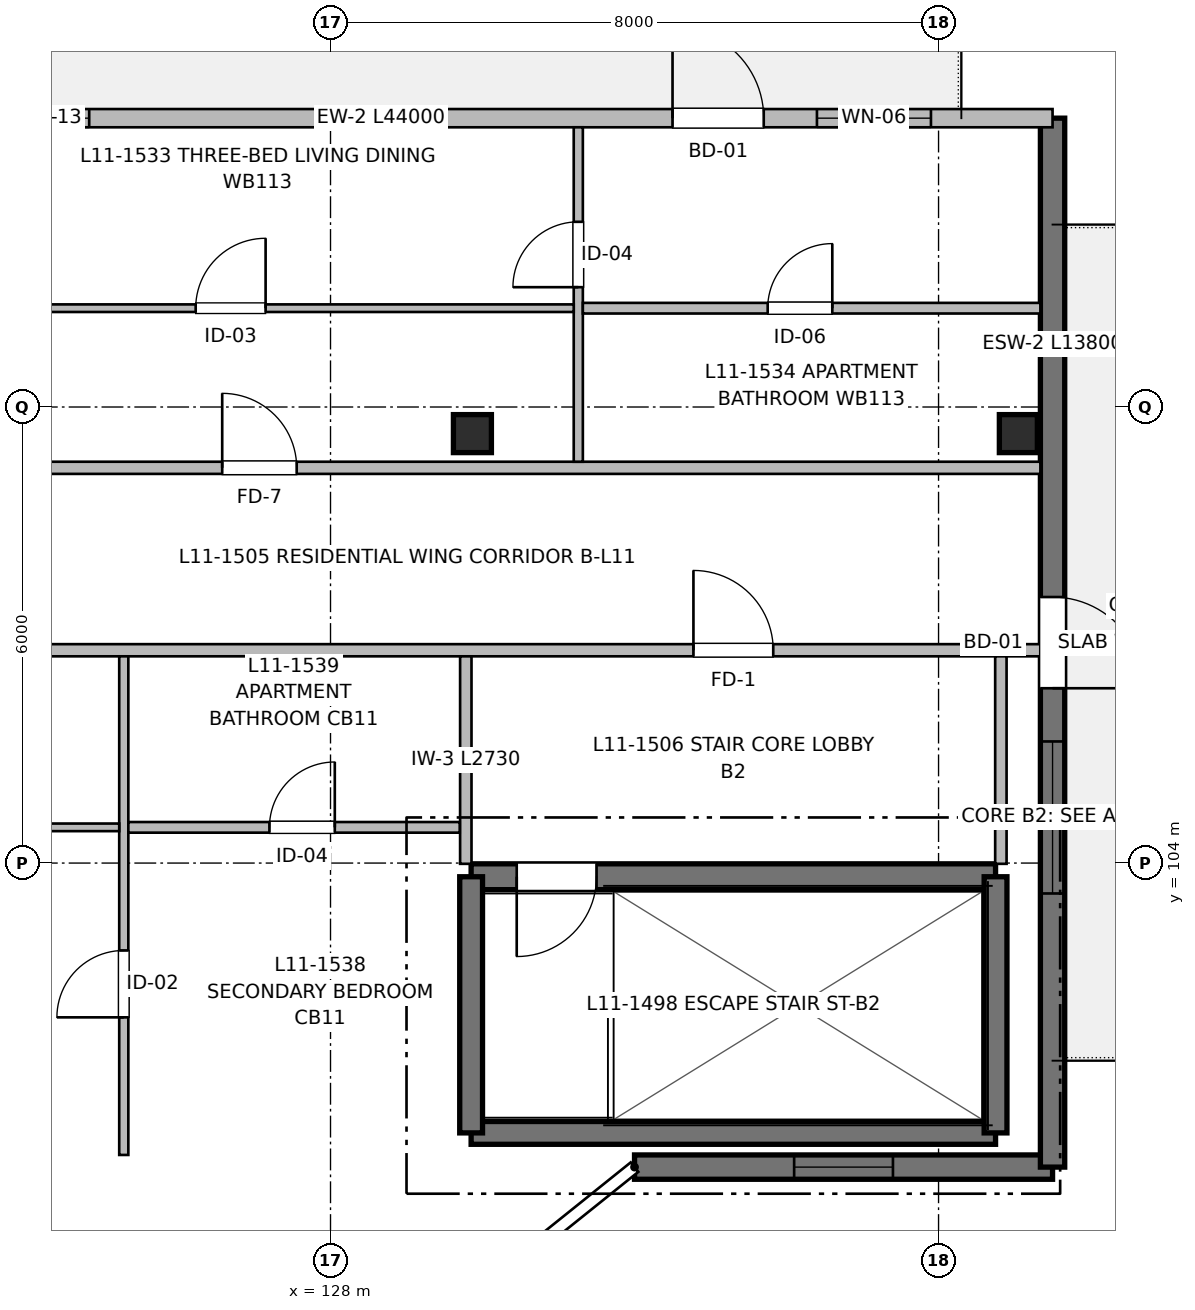
"""IFC4 building model, lengths in metres.
Left out: names, types, materials, properties, quantities, classifications, styles, units other than length and angle.
Written with IfcOpenShell. Run it as: python <this file> out.ifc"""

import sys

from ifc_helpers import new_model, si_unit, direction, frame, frame_2d, origin, origin_2d, place, context, subcontext, project, spatial, rectangle, extrude, element, fill, save


model = new_model("IFC4")
c1 = context("Model", 3, precision=1e-05, world=origin(), true_north=direction((0.0, 1.0)))
c2 = subcontext(c1, "Body", "Model", "MODEL_VIEW")
j1 = project(units=[si_unit("LENGTHUNIT", "METRE"), si_unit("PLANEANGLEUNIT", "RADIAN")], contexts=[c1])
p1 = place(None, origin())
s1 = spatial("IfcSite", under=j1, at=p1, CompositionType="ELEMENT")
p2 = place(p1, origin())
s2 = spatial("IfcBuilding", under=s1, at=p2, CompositionType="ELEMENT")
p3 = place(p2, frame((0.0, 0.0, 36.16)))
s3 = spatial("IfcBuildingStorey", under=s2, at=p3, CompositionType="ELEMENT", Elevation=36.16)
for number, where, z_axis, x_axis in (
    (1, (129.867, 109.65, 0.0), (0.0, 0.0, 1.0), (1.0, 0.0, 0.0)),
    (2, (137.05, 109.65, 0.0), (0.0, 0.0, 1.0), (1.0, 0.0, 0.0)),
):
    element("IfcColumn", number, at=place(p3, frame(where, z_axis=z_axis, x_axis=x_axis)), inside=s3, PredefinedType="COLUMN", context=c2, shape_type="SweptSolid", body=[
        extrude(rectangle(XDim=0.5, YDim=0.5, at=origin_2d()), origin(), (0.0, 0.0, 1.0), 3.2),
    ])
p4 = place(p3, frame((129.85, 100.45, 0.0), z_axis=(0.0, 0.0, 1.0), x_axis=(1.0, 0.0, 0.0)))
e3 = element("IfcWall", 3, at=p4, inside=s3, PredefinedType="SHEAR", context=c2, shape_type="SweptSolid", body=[
    extrude(rectangle(XDim=6.9, YDim=0.3, at=frame_2d((3.45, 0.0))), origin(), (0.0, 0.0, 1.0), 3.2),
])
p5 = place(p3, frame((136.75, 103.82, 0.0), z_axis=(0.0, 0.0, 1.0), x_axis=(-1.0, 0.0, 0.0)))
e4 = element("IfcWall", 4, at=p5, inside=s3, PredefinedType="SHEAR", context=c2, shape_type="SweptSolid", body=[
    extrude(rectangle(XDim=6.9, YDim=0.34, at=frame_2d((3.45, 0.0))), origin(), (0.0, 0.0, 1.0), 3.2),
])
p6 = place(p5, frame((5.25, 0.0, 0.0)))
e5 = element("IfcOpeningElement", 5, at=p6, cuts=e4, PredefinedType="OPENING", context=c2, shape_type="SweptSolid", body=[
    extrude(rectangle(XDim=1.05, YDim=2.15, at=frame_2d((0.525, 1.075))), frame((0.0, 0.18, 0.0), z_axis=(0.0, -1.0, 0.0), x_axis=(1.0, 0.0, 0.0)), (0.0, 0.0, 1.0), 0.36),
])
for number, where, z_axis, x_axis in (
    (6, (129.85, 103.82, 0.0), (0.0, 0.0, 1.0), (0.0, -1.0, 0.0)),
    (7, (136.75, 100.45, 0.0), (0.0, 0.0, 1.0), (0.0, 1.0, 0.0)),
):
    element("IfcWall", number, at=place(p3, frame(where, z_axis=z_axis, x_axis=x_axis)), inside=s3, PredefinedType="SHEAR", context=c2, shape_type="SweptSolid", body=[
        extrude(rectangle(XDim=3.37, YDim=0.3, at=frame_2d((1.685, 0.0))), origin(), (0.0, 0.0, 1.0), 3.2),
    ])
p7 = place(p3, frame((137.5, 100.0, 0.0), z_axis=(0.0, 0.0, 1.0), x_axis=(-1.0, 0.0, 0.0)))
e8 = element("IfcWall", 8, at=p7, inside=s3, PredefinedType="SHEAR", context=c2, shape_type="SweptSolid", body=[
    extrude(rectangle(XDim=5.5, YDim=0.32, at=frame_2d((2.75, 0.0))), origin(), (0.0, 0.0, 1.0), 2.98),
])
p8 = place(p7, frame((2.1, 0.0, 0.82)))
e9 = element("IfcOpeningElement", 9, at=p8, cuts=e8, PredefinedType="OPENING", context=c2, shape_type="SweptSolid", body=[
    extrude(rectangle(XDim=1.3, YDim=1.4, at=frame_2d((0.65, 0.7))), frame((0.0, 0.17, 0.0), z_axis=(0.0, -1.0, 0.0), x_axis=(1.0, 0.0, 0.0)), (0.0, 0.0, 1.0), 0.34),
])
p9 = place(p3, frame((137.5, 113.8, 0.0), z_axis=(0.0, 0.0, 1.0), x_axis=(0.0, -1.0, 0.0)))
e10 = element("IfcWall", 10, at=p9, inside=s3, PredefinedType="SHEAR", context=c2, shape_type="SweptSolid", body=[
    extrude(rectangle(XDim=13.8, YDim=0.32, at=frame_2d((6.9, 0.0))), origin(), (0.0, 0.0, 1.0), 2.98),
])
p10 = place(p9, frame((6.3, 0.0, 0.0)))
e11 = element("IfcOpeningElement", 11, at=p10, cuts=e10, PredefinedType="OPENING", context=c2, shape_type="SweptSolid", body=[
    extrude(rectangle(XDim=1.2, YDim=2.2, at=frame_2d((0.6, 1.1))), frame((0.0, 0.17, 0.0), z_axis=(0.0, -1.0, 0.0), x_axis=(1.0, 0.0, 0.0)), (0.0, 0.0, 1.0), 0.34),
])
p11 = place(p9, frame((8.2, 0.0, 0.72)))
e12 = element("IfcOpeningElement", 12, at=p11, cuts=e10, PredefinedType="OPENING", context=c2, shape_type="SweptSolid", body=[
    extrude(rectangle(XDim=2.0, YDim=1.5, at=frame_2d((1.0, 0.75))), frame((0.0, 0.17, 0.0), z_axis=(0.0, -1.0, 0.0), x_axis=(1.0, 0.0, 0.0)), (0.0, 0.0, 1.0), 0.34),
])
p12 = place(p3, frame((93.5, 113.8, 0.0), z_axis=(0.0, 0.0, 1.0), x_axis=(1.0, 0.0, 0.0)))
e13 = element("IfcWall", 13, at=p12, inside=s3, PredefinedType="SOLIDWALL", context=c2, shape_type="SweptSolid", body=[
    extrude(rectangle(XDim=44.0, YDim=0.24, at=frame_2d((22.0, 0.0))), origin(), (0.0, 0.0, 1.0), 2.98),
])
p13 = place(p12, frame((3.8, 0.0, 0.0)))
e14 = element("IfcOpeningElement", 14, at=p13, cuts=e13, PredefinedType="OPENING", context=c2, shape_type="SweptSolid", body=[
    extrude(rectangle(XDim=1.2, YDim=2.2, at=frame_2d((0.6, 1.1))), frame((0.0, 0.13, 0.0), z_axis=(0.0, -1.0, 0.0), x_axis=(1.0, 0.0, 0.0)), (0.0, 0.0, 1.0), 0.26),
])
p14 = place(p12, frame((5.7, 0.0, 0.72)))
e15 = element("IfcOpeningElement", 15, at=p14, cuts=e13, PredefinedType="OPENING", context=c2, shape_type="SweptSolid", body=[
    extrude(rectangle(XDim=2.0, YDim=1.5, at=frame_2d((1.0, 0.75))), frame((0.0, 0.13, 0.0), z_axis=(0.0, -1.0, 0.0), x_axis=(1.0, 0.0, 0.0)), (0.0, 0.0, 1.0), 0.26),
])
p15 = place(p12, frame((12.15, 0.0, 0.67)))
e16 = element("IfcOpeningElement", 16, at=p15, cuts=e13, PredefinedType="OPENING", context=c2, shape_type="SweptSolid", body=[
    extrude(rectangle(XDim=2.1, YDim=1.55, at=frame_2d((1.05, 0.775))), frame((0.0, 0.13, 0.0), z_axis=(0.0, -1.0, 0.0), x_axis=(1.0, 0.0, 0.0)), (0.0, 0.0, 1.0), 0.26),
])
p16 = place(p12, frame((21.4, 0.0, 0.0)))
e17 = element("IfcOpeningElement", 17, at=p16, cuts=e13, PredefinedType="OPENING", context=c2, shape_type="SweptSolid", body=[
    extrude(rectangle(XDim=1.2, YDim=2.2, at=frame_2d((0.6, 1.1))), frame((0.0, 0.13, 0.0), z_axis=(0.0, -1.0, 0.0), x_axis=(1.0, 0.0, 0.0)), (0.0, 0.0, 1.0), 0.26),
])
p17 = place(p12, frame((23.3, 0.0, 0.77)))
e18 = element("IfcOpeningElement", 18, at=p17, cuts=e13, PredefinedType="OPENING", context=c2, shape_type="SweptSolid", body=[
    extrude(rectangle(XDim=1.6, YDim=1.45, at=frame_2d((0.8, 0.725))), frame((0.0, 0.13, 0.0), z_axis=(0.0, -1.0, 0.0), x_axis=(1.0, 0.0, 0.0)), (0.0, 0.0, 1.0), 0.26),
])
p18 = place(p12, frame((30.275, 0.0, 0.9)))
e19 = element("IfcOpeningElement", 19, at=p18, cuts=e13, PredefinedType="OPENING", context=c2, shape_type="SweptSolid", body=[
    extrude(rectangle(XDim=1.05, YDim=1.15, at=frame_2d((0.525, 0.575))), frame((0.0, 0.13, 0.0), z_axis=(0.0, -1.0, 0.0), x_axis=(1.0, 0.0, 0.0)), (0.0, 0.0, 1.0), 0.26),
])
p19 = place(p12, frame((39.0, 0.0, 0.0)))
e20 = element("IfcOpeningElement", 20, at=p19, cuts=e13, PredefinedType="OPENING", context=c2, shape_type="SweptSolid", body=[
    extrude(rectangle(XDim=1.2, YDim=2.2, at=frame_2d((0.6, 1.1))), frame((0.0, 0.13, 0.0), z_axis=(0.0, -1.0, 0.0), x_axis=(1.0, 0.0, 0.0)), (0.0, 0.0, 1.0), 0.26),
])
p20 = place(p12, frame((40.9, 0.0, 0.82)))
e21 = element("IfcOpeningElement", 21, at=p20, cuts=e13, PredefinedType="OPENING", context=c2, shape_type="SweptSolid", body=[
    extrude(rectangle(XDim=1.5, YDim=1.4, at=frame_2d((0.75, 0.7))), frame((0.0, 0.13, 0.0), z_axis=(0.0, -1.0, 0.0), x_axis=(1.0, 0.0, 0.0)), (0.0, 0.0, 1.0), 0.26),
])
p21 = place(p3, frame((113.2, 106.8, 0.0), z_axis=(0.0, 0.0, 1.0), x_axis=(1.0, 0.0, 0.0)))
e22 = element("IfcWall", 22, at=p21, inside=s3, PredefinedType="PARTITIONING", context=c2, shape_type="SweptSolid", body=[
    extrude(rectangle(XDim=24.14, YDim=0.16, at=frame_2d((12.07, 0.0))), origin(), (0.0, 0.0, 1.0), 2.935),
])
p22 = place(p21, frame((19.575, 0.0, 0.0)))
e23 = element("IfcOpeningElement", 23, at=p22, cuts=e22, PredefinedType="OPENING", context=c2, shape_type="SweptSolid", body=[
    extrude(rectangle(XDim=1.05, YDim=2.15, at=frame_2d((0.525, 1.075))), frame((0.0, 0.09, 0.0), z_axis=(0.0, -1.0, 0.0), x_axis=(1.0, 0.0, 0.0)), (0.0, 0.0, 1.0), 0.18),
])
p23 = place(p21, frame((8.995, 0.0, 0.0)))
e24 = element("IfcOpeningElement", 24, at=p23, cuts=e22, PredefinedType="OPENING", context=c2, shape_type="SweptSolid", body=[
    extrude(rectangle(XDim=0.98, YDim=2.15, at=frame_2d((0.49, 1.075))), frame((0.0, 0.09, 0.0), z_axis=(0.0, -1.0, 0.0), x_axis=(1.0, 0.0, 0.0)), (0.0, 0.0, 1.0), 0.18),
])
p24 = place(p3, frame((93.66, 109.2, 0.0), z_axis=(0.0, 0.0, 1.0), x_axis=(1.0, 0.0, 0.0)))
e25 = element("IfcWall", 25, at=p24, inside=s3, PredefinedType="PARTITIONING", context=c2, shape_type="SweptSolid", body=[
    extrude(rectangle(XDim=43.68, YDim=0.16, at=frame_2d((21.84, 0.0))), origin(), (0.0, 0.0, 1.0), 2.935),
])
p25 = place(p24, frame((3.705, 0.0, 0.0)))
e26 = element("IfcOpeningElement", 26, at=p25, cuts=e25, PredefinedType="OPENING", context=c2, shape_type="SweptSolid", body=[
    extrude(rectangle(XDim=0.98, YDim=2.15, at=frame_2d((0.49, 1.075))), frame((0.0, 0.09, 0.0), z_axis=(0.0, -1.0, 0.0), x_axis=(1.0, 0.0, 0.0)), (0.0, 0.0, 1.0), 0.18),
])
p26 = place(p24, frame((18.33, 0.0, 0.0)))
e27 = element("IfcOpeningElement", 27, at=p26, cuts=e25, PredefinedType="OPENING", context=c2, shape_type="SweptSolid", body=[
    extrude(rectangle(XDim=0.98, YDim=2.15, at=frame_2d((0.49, 1.075))), frame((0.0, 0.09, 0.0), z_axis=(0.0, -1.0, 0.0), x_axis=(1.0, 0.0, 0.0)), (0.0, 0.0, 1.0), 0.18),
])
p27 = place(p24, frame((32.915, 0.0, 0.0)))
e28 = element("IfcOpeningElement", 28, at=p27, cuts=e25, PredefinedType="OPENING", context=c2, shape_type="SweptSolid", body=[
    extrude(rectangle(XDim=0.98, YDim=2.15, at=frame_2d((0.49, 1.075))), frame((0.0, 0.09, 0.0), z_axis=(0.0, -1.0, 0.0), x_axis=(1.0, 0.0, 0.0)), (0.0, 0.0, 1.0), 0.18),
])
for number, where, z_axis, x_axis in (
    (29, (129.78, 103.99, 0.0), (0.0, 0.0, 1.0), (0.0, 1.0, 0.0)),
    (30, (136.82, 103.99, 0.0), (0.0, 0.0, 1.0), (0.0, 1.0, 0.0)),
):
    element("IfcWall", number, at=place(p3, frame(where, z_axis=z_axis, x_axis=x_axis)), inside=s3, PredefinedType="PARTITIONING", context=c2, shape_type="SweptSolid", body=[
        extrude(rectangle(XDim=2.73, YDim=0.15, at=frame_2d((1.365, 0.0))), origin(), (0.0, 0.0, 1.0), 2.935),
    ])
p28 = place(p3, frame((131.26, 109.28, 0.0), z_axis=(0.0, 0.0, 1.0), x_axis=(0.0, 1.0, 0.0)))
e31 = element("IfcWall", 31, at=p28, inside=s3, PredefinedType="PARTITIONING", context=c2, shape_type="SweptSolid", body=[
    extrude(rectangle(XDim=4.4, YDim=0.12, at=frame_2d((2.2, 0.0))), origin(), (0.0, 0.0, 1.0), 2.935),
])
p29 = place(p28, frame((2.296, 0.0, 0.0)))
e32 = element("IfcOpeningElement", 32, at=p29, cuts=e31, PredefinedType="OPENING", context=c2, shape_type="SweptSolid", body=[
    extrude(rectangle(XDim=0.86, YDim=2.1, at=frame_2d((0.43, 1.05))), frame((0.0, 0.07, 0.0), z_axis=(0.0, -1.0, 0.0), x_axis=(1.0, 0.0, 0.0)), (0.0, 0.0, 1.0), 0.14),
])
p30 = place(p3, frame((131.32, 111.3, 0.0), z_axis=(0.0, 0.0, 1.0), x_axis=(1.0, 0.0, 0.0)))
e33 = element("IfcWall", 33, at=p30, inside=s3, PredefinedType="PARTITIONING", context=c2, shape_type="SweptSolid", body=[
    extrude(rectangle(XDim=6.02, YDim=0.14, at=frame_2d((3.01, 0.0))), origin(), (0.0, 0.0, 1.0), 2.935),
])
p31 = place(p30, frame((2.432, 0.0, 0.0)))
e34 = element("IfcOpeningElement", 34, at=p31, cuts=e33, PredefinedType="OPENING", context=c2, shape_type="SweptSolid", body=[
    extrude(rectangle(XDim=0.85, YDim=2.05, at=frame_2d((0.425, 1.025))), frame((0.0, 0.08, 0.0), z_axis=(0.0, -1.0, 0.0), x_axis=(1.0, 0.0, 0.0)), (0.0, 0.0, 1.0), 0.16),
])
p32 = place(p3, frame((122.87, 111.3, 0.0), z_axis=(0.0, 0.0, 1.0), x_axis=(1.0, 0.0, 0.0)))
e35 = element("IfcWall", 35, at=p32, inside=s3, PredefinedType="PARTITIONING", context=c2, shape_type="SweptSolid", body=[
    extrude(rectangle(XDim=8.33, YDim=0.1, at=frame_2d((4.165, 0.0))), origin(), (0.0, 0.0, 1.0), 2.935),
])
p33 = place(p32, frame((3.356, 0.0, 0.0)))
e36 = element("IfcOpeningElement", 36, at=p33, cuts=e35, PredefinedType="OPENING", context=c2, shape_type="SweptSolid", body=[
    extrude(rectangle(XDim=0.92, YDim=2.1, at=frame_2d((0.46, 1.05))), frame((0.0, 0.06, 0.0), z_axis=(0.0, -1.0, 0.0), x_axis=(1.0, 0.0, 0.0)), (0.0, 0.0, 1.0), 0.12),
])
p34 = place(p3, frame((125.28, 100.16, 0.0), z_axis=(0.0, 0.0, 1.0), x_axis=(0.0, 1.0, 0.0)))
e37 = element("IfcWall", 37, at=p34, inside=s3, PredefinedType="PARTITIONING", context=c2, shape_type="SweptSolid", body=[
    extrude(rectangle(XDim=6.56, YDim=0.12, at=frame_2d((3.28, 0.0))), origin(), (0.0, 0.0, 1.0), 2.935),
])
p35 = place(p34, frame((1.81, 0.0, 0.0)))
e38 = element("IfcOpeningElement", 38, at=p35, cuts=e37, PredefinedType="OPENING", context=c2, shape_type="SweptSolid", body=[
    extrude(rectangle(XDim=0.88, YDim=2.1, at=frame_2d((0.44, 1.05))), frame((0.0, 0.07, 0.0), z_axis=(0.0, -1.0, 0.0), x_axis=(1.0, 0.0, 0.0)), (0.0, 0.0, 1.0), 0.14),
])
p36 = place(p3, frame((125.34, 104.47, 0.0), z_axis=(0.0, 0.0, 1.0), x_axis=(1.0, 0.0, 0.0)))
e39 = element("IfcWall", 39, at=p36, inside=s3, PredefinedType="PARTITIONING", context=c2, shape_type="SweptSolid", body=[
    extrude(rectangle(XDim=4.36, YDim=0.14, at=frame_2d((2.18, 0.0))), origin(), (0.0, 0.0, 1.0), 2.935),
])
p37 = place(p36, frame((1.856, 0.0, 0.0)))
e40 = element("IfcOpeningElement", 40, at=p37, cuts=e39, PredefinedType="OPENING", context=c2, shape_type="SweptSolid", body=[
    extrude(rectangle(XDim=0.86, YDim=2.1, at=frame_2d((0.43, 1.05))), frame((0.0, 0.08, 0.0), z_axis=(0.0, -1.0, 0.0), x_axis=(1.0, 0.0, 0.0)), (0.0, 0.0, 1.0), 0.16),
])
p38 = place(p3, frame((120.09, 104.47, 0.0), z_axis=(0.0, 0.0, 1.0), x_axis=(1.0, 0.0, 0.0)))
e41 = element("IfcWall", 41, at=p38, inside=s3, PredefinedType="PARTITIONING", context=c2, shape_type="SweptSolid", body=[
    extrude(rectangle(XDim=5.13, YDim=0.1, at=frame_2d((2.565, 0.0))), origin(), (0.0, 0.0, 1.0), 2.935),
])
p39 = place(p38, frame((2.18, 0.0, 0.0)))
e42 = element("IfcOpeningElement", 42, at=p39, cuts=e41, PredefinedType="OPENING", context=c2, shape_type="SweptSolid", body=[
    extrude(rectangle(XDim=0.92, YDim=2.1, at=frame_2d((0.46, 1.05))), frame((0.0, 0.06, 0.0), z_axis=(0.0, -1.0, 0.0), x_axis=(1.0, 0.0, 0.0)), (0.0, 0.0, 1.0), 0.12),
])
p40 = place(p6, origin())
e43 = element("IfcDoor", 43, at=p40, inside=s3, OperationType="SINGLE_SWING_RIGHT", PredefinedType="DOOR", context=c2, shape_type="SweptSolid", body=[
    extrude(rectangle(XDim=1.05, YDim=2.15, at=frame_2d((0.525, 1.075))), frame((0.0, 0.025, 0.0), z_axis=(0.0, -1.0, 0.0), x_axis=(1.0, 0.0, 0.0)), (0.0, 0.0, 1.0), 0.05),
])
fill(e5, e43)
p41 = place(p8, origin())
e44 = element("IfcWindow", 44, at=p41, inside=s3, PartitioningType="SINGLE_PANEL", PredefinedType="WINDOW", context=c2, shape_type="SweptSolid", body=[
    extrude(rectangle(XDim=1.3, YDim=1.4, at=frame_2d((0.65, 0.7))), frame((0.0, 0.03, 0.0), z_axis=(0.0, -1.0, 0.0), x_axis=(1.0, 0.0, 0.0)), (0.0, 0.0, 1.0), 0.06),
])
fill(e9, e44)
p42 = place(p10, origin())
e45 = element("IfcDoor", 45, at=p42, inside=s3, OperationType="SINGLE_SWING_RIGHT", PredefinedType="DOOR", context=c2, shape_type="SweptSolid", body=[
    extrude(rectangle(XDim=1.2, YDim=2.2, at=frame_2d((0.6, 1.1))), frame((0.0, 0.025, 0.0), z_axis=(0.0, -1.0, 0.0), x_axis=(1.0, 0.0, 0.0)), (0.0, 0.0, 1.0), 0.05),
])
fill(e11, e45)
p43 = place(p11, origin())
e46 = element("IfcWindow", 46, at=p43, inside=s3, PartitioningType="SINGLE_PANEL", PredefinedType="WINDOW", context=c2, shape_type="SweptSolid", body=[
    extrude(rectangle(XDim=2.0, YDim=1.5, at=frame_2d((1.0, 0.75))), frame((0.0, 0.03, 0.0), z_axis=(0.0, -1.0, 0.0), x_axis=(1.0, 0.0, 0.0)), (0.0, 0.0, 1.0), 0.06),
])
fill(e12, e46)
p44 = place(p18, origin())
e47 = element("IfcWindow", 47, at=p44, inside=s3, PartitioningType="SINGLE_PANEL", PredefinedType="WINDOW", context=c2, shape_type="SweptSolid", body=[
    extrude(rectangle(XDim=1.05, YDim=1.15, at=frame_2d((0.525, 0.575))), frame((0.0, 0.03, 0.0), z_axis=(0.0, -1.0, 0.0), x_axis=(1.0, 0.0, 0.0)), (0.0, 0.0, 1.0), 0.06),
])
fill(e19, e47)
p45 = place(p19, origin())
e48 = element("IfcDoor", 48, at=p45, inside=s3, OperationType="SINGLE_SWING_LEFT", PredefinedType="DOOR", context=c2, shape_type="SweptSolid", body=[
    extrude(rectangle(XDim=1.2, YDim=2.2, at=frame_2d((0.6, 1.1))), frame((0.0, 0.025, 0.0), z_axis=(0.0, -1.0, 0.0), x_axis=(1.0, 0.0, 0.0)), (0.0, 0.0, 1.0), 0.05),
])
fill(e20, e48)
p46 = place(p20, origin())
e49 = element("IfcWindow", 49, at=p46, inside=s3, PartitioningType="SINGLE_PANEL", PredefinedType="WINDOW", context=c2, shape_type="SweptSolid", body=[
    extrude(rectangle(XDim=1.5, YDim=1.4, at=frame_2d((0.75, 0.7))), frame((0.0, 0.03, 0.0), z_axis=(0.0, -1.0, 0.0), x_axis=(1.0, 0.0, 0.0)), (0.0, 0.0, 1.0), 0.06),
])
fill(e21, e49)
p47 = place(p22, origin())
e50 = element("IfcDoor", 50, at=p47, inside=s3, OperationType="SINGLE_SWING_LEFT", PredefinedType="DOOR", context=c2, shape_type="SweptSolid", body=[
    extrude(rectangle(XDim=1.05, YDim=2.15, at=frame_2d((0.525, 1.075))), frame((0.0, 0.025, 0.0), z_axis=(0.0, -1.0, 0.0), x_axis=(1.0, 0.0, 0.0)), (0.0, 0.0, 1.0), 0.05),
])
fill(e23, e50)
p48 = place(p27, origin())
e51 = element("IfcDoor", 51, at=p48, inside=s3, OperationType="SINGLE_SWING_LEFT", PredefinedType="DOOR", context=c2, shape_type="SweptSolid", body=[
    extrude(rectangle(XDim=0.98, YDim=2.15, at=frame_2d((0.49, 1.075))), frame((0.0, 0.025, 0.0), z_axis=(0.0, -1.0, 0.0), x_axis=(1.0, 0.0, 0.0)), (0.0, 0.0, 1.0), 0.05),
])
fill(e28, e51)
p49 = place(p33, origin())
e52 = element("IfcDoor", 52, at=p49, inside=s3, OperationType="SINGLE_SWING_RIGHT", PredefinedType="DOOR", context=c2, shape_type="SweptSolid", body=[
    extrude(rectangle(XDim=0.92, YDim=2.1, at=frame_2d((0.46, 1.05))), frame((0.0, 0.025, 0.0), z_axis=(0.0, -1.0, 0.0), x_axis=(1.0, 0.0, 0.0)), (0.0, 0.0, 1.0), 0.05),
])
fill(e36, e52)
p50 = place(p29, origin())
e53 = element("IfcDoor", 53, at=p50, inside=s3, OperationType="SINGLE_SWING_LEFT", PredefinedType="DOOR", context=c2, shape_type="SweptSolid", body=[
    extrude(rectangle(XDim=0.86, YDim=2.1, at=frame_2d((0.43, 1.05))), frame((0.0, 0.025, 0.0), z_axis=(0.0, -1.0, 0.0), x_axis=(1.0, 0.0, 0.0)), (0.0, 0.0, 1.0), 0.05),
])
fill(e32, e53)
p51 = place(p31, origin())
e54 = element("IfcDoor", 54, at=p51, inside=s3, OperationType="SINGLE_SWING_RIGHT", PredefinedType="DOOR", context=c2, shape_type="SweptSolid", body=[
    extrude(rectangle(XDim=0.85, YDim=2.05, at=frame_2d((0.425, 1.025))), frame((0.0, 0.025, 0.0), z_axis=(0.0, -1.0, 0.0), x_axis=(1.0, 0.0, 0.0)), (0.0, 0.0, 1.0), 0.05),
])
fill(e34, e54)
p52 = place(p35, origin())
e55 = element("IfcDoor", 55, at=p52, inside=s3, OperationType="SINGLE_SWING_LEFT", PredefinedType="DOOR", context=c2, shape_type="SweptSolid", body=[
    extrude(rectangle(XDim=0.88, YDim=2.1, at=frame_2d((0.44, 1.05))), frame((0.0, 0.025, 0.0), z_axis=(0.0, -1.0, 0.0), x_axis=(1.0, 0.0, 0.0)), (0.0, 0.0, 1.0), 0.05),
])
fill(e38, e55)
p53 = place(p37, origin())
e56 = element("IfcDoor", 56, at=p53, inside=s3, OperationType="SINGLE_SWING_RIGHT", PredefinedType="DOOR", context=c2, shape_type="SweptSolid", body=[
    extrude(rectangle(XDim=0.86, YDim=2.1, at=frame_2d((0.43, 1.05))), frame((0.0, 0.025, 0.0), z_axis=(0.0, -1.0, 0.0), x_axis=(1.0, 0.0, 0.0)), (0.0, 0.0, 1.0), 0.05),
])
fill(e40, e56)
save(model, sys.argv[1])
